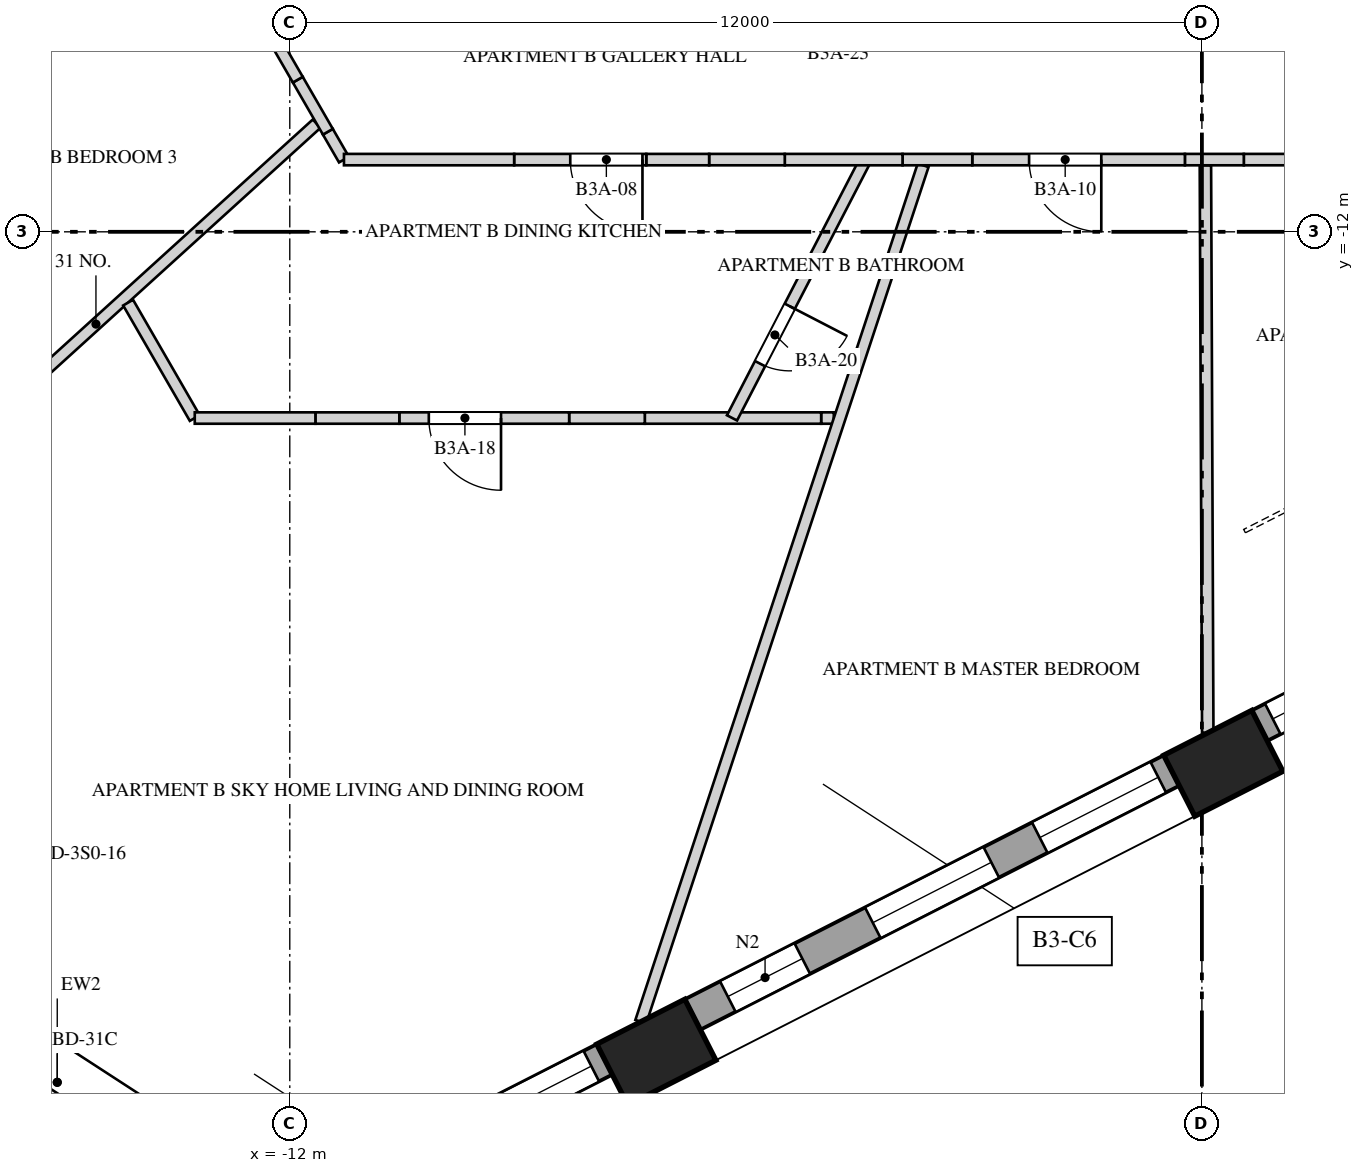
"""IFC4 building model, lengths in metres.
Left out: names, types, materials, properties, quantities, classifications, styles, units other than length and angle.
Written with IfcOpenShell. Run it as: python <this file> out.ifc"""

import sys

from ifc_helpers import new_model, si_unit, direction, frame, frame_2d, origin, origin_2d, place, context, subcontext, project, spatial, polyline, rectangle, outline, extrude, element, fill, save


model = new_model("IFC4")
c1 = context("Model", 3, precision=1e-05, world=origin(), true_north=direction((0.0, 1.0)))
c2 = subcontext(c1, "Body", "Model", "MODEL_VIEW")
j1 = project(units=[si_unit("LENGTHUNIT", "METRE"), si_unit("PLANEANGLEUNIT", "RADIAN")], contexts=[c1])
p1 = place(None, origin())
s1 = spatial("IfcSite", under=j1, at=p1, CompositionType="ELEMENT")
p2 = place(p1, origin())
s2 = spatial("IfcBuilding", under=s1, at=p2, CompositionType="ELEMENT")
p3 = place(p2, frame((0.0, 0.0, 129.6)))
s3 = spatial("IfcBuildingStorey", under=s2, at=p3, CompositionType="ELEMENT", Elevation=129.6)
for number, where, z_axis, x_axis in (
    (1, (-7.178, -22.793, 0.0), (0.0, 0.0, 1.0), (0.891, 0.454, 0.0)),
    (2, (0.281, -18.992, 0.0), (0.0, 0.0, 1.0), (0.891, 0.454, 0.0)),
):
    element("IfcColumn", number, at=place(p3, frame(where, z_axis=z_axis, x_axis=x_axis)), inside=s3, PredefinedType="COLUMN", context=c2, shape_type="SweptSolid", body=[
        extrude(rectangle(XDim=1.3, YDim=0.9, at=origin_2d()), origin(), (0.0, 0.0, 1.0), 4.0),
    ])
p4 = place(p3, frame((-13.581, -25.803, 0.0), z_axis=(0.0, 0.0, 1.0), x_axis=(0.891010191031, 0.453983303085, 0.0)))
e3 = element("IfcWall", 3, at=p4, inside=s3, PredefinedType="SOLIDWALL", context=c2, shape_type="SweptSolid", body=[
    extrude(rectangle(XDim=6.422, YDim=0.45, at=frame_2d((3.211, 0.0))), origin(), (0.0, 0.0, 1.0), 3.3),
])
p5 = place(p4, frame((0.195, 0.0, 0.5)))
e4 = element("IfcOpeningElement", 4, at=p5, cuts=e3, PredefinedType="OPENING", context=c2, shape_type="SweptSolid", body=[
    extrude(rectangle(XDim=1.1, YDim=2.0, at=frame_2d((0.55, 1.0))), frame((0.0, 0.235, 0.0), z_axis=(0.0, -1.0, 0.0), x_axis=(1.0, 0.0, 0.0)), (0.0, 0.0, 1.0), 0.47),
])
p6 = place(p4, frame((2.011, 0.0, 0.5)))
e5 = element("IfcOpeningElement", 5, at=p6, cuts=e3, PredefinedType="OPENING", context=c2, shape_type="SweptSolid", body=[
    extrude(rectangle(XDim=1.75, YDim=2.65, at=frame_2d((0.875, 1.325))), frame((0.0, 0.235, 0.0), z_axis=(0.0, -1.0, 0.0), x_axis=(1.0, 0.0, 0.0)), (0.0, 0.0, 1.0), 0.47),
])
p7 = place(p4, frame((4.476, 0.0, 0.5)))
e6 = element("IfcOpeningElement", 6, at=p7, cuts=e3, PredefinedType="OPENING", context=c2, shape_type="SweptSolid", body=[
    extrude(rectangle(XDim=1.75, YDim=2.65, at=frame_2d((0.875, 1.325))), frame((0.0, 0.235, 0.0), z_axis=(0.0, -1.0, 0.0), x_axis=(1.0, 0.0, 0.0)), (0.0, 0.0, 1.0), 0.47),
])
p8 = place(p3, frame((-6.701, -22.297, 0.0), z_axis=(0.0, 0.0, 1.0), x_axis=(0.891004189171, 0.45399508244, 0.0)))
e7 = element("IfcWall", 7, at=p8, inside=s3, PredefinedType="SOLIDWALL", context=c2, shape_type="SweptSolid", body=[
    extrude(rectangle(XDim=7.072, YDim=0.45, at=frame_2d((3.536, 0.0))), origin(), (0.0, 0.0, 1.0), 3.3),
])
p9 = place(p8, frame((0.52, 0.0, 0.5)))
e8 = element("IfcOpeningElement", 8, at=p9, cuts=e7, PredefinedType="OPENING", context=c2, shape_type="SweptSolid", body=[
    extrude(rectangle(XDim=1.1, YDim=2.65, at=frame_2d((0.55, 1.325))), frame((0.0, 0.235, 0.0), z_axis=(0.0, -1.0, 0.0), x_axis=(1.0, 0.0, 0.0)), (0.0, 0.0, 1.0), 0.47),
])
p10 = place(p8, frame((2.661, 0.0, 0.5)))
e9 = element("IfcOpeningElement", 9, at=p10, cuts=e7, PredefinedType="OPENING", context=c2, shape_type="SweptSolid", body=[
    extrude(rectangle(XDim=1.75, YDim=2.65, at=frame_2d((0.875, 1.325))), frame((0.0, 0.235, 0.0), z_axis=(0.0, -1.0, 0.0), x_axis=(1.0, 0.0, 0.0)), (0.0, 0.0, 1.0), 0.47),
])
p11 = place(p8, frame((5.126, 0.0, 0.5)))
e10 = element("IfcOpeningElement", 10, at=p11, cuts=e7, PredefinedType="OPENING", context=c2, shape_type="SweptSolid", body=[
    extrude(rectangle(XDim=1.75, YDim=2.65, at=frame_2d((0.875, 1.325))), frame((0.0, 0.235, 0.0), z_axis=(0.0, -1.0, 0.0), x_axis=(1.0, 0.0, 0.0)), (0.0, 0.0, 1.0), 0.47),
])
p12 = place(p3, frame((0.758, -18.497, 0.0), z_axis=(0.0, 0.0, 1.0), x_axis=(0.890979432498, 0.454043666254, 0.0)))
e11 = element("IfcWall", 11, at=p12, inside=s3, PredefinedType="SOLIDWALL", context=c2, shape_type="SweptSolid", body=[
    extrude(rectangle(XDim=2.141, YDim=0.45, at=frame_2d((1.07, 0.0))), origin(), (0.0, 0.0, 1.0), 3.3),
])
p13 = place(p12, frame((0.195, 0.0, 0.5)))
e12 = element("IfcOpeningElement", 12, at=p13, cuts=e11, PredefinedType="OPENING", context=c2, shape_type="SweptSolid", body=[
    extrude(rectangle(XDim=1.75, YDim=2.65, at=frame_2d((0.875, 1.325))), frame((0.0, 0.235, 0.0), z_axis=(0.0, -1.0, 0.0), x_axis=(1.0, 0.0, 0.0)), (0.0, 0.0, 1.0), 0.47),
])
p14 = place(p3, frame((-13.592, -24.142, 0.0), z_axis=(0.0, 0.0, 1.0), x_axis=(-0.838665071449, 0.544647498784, 0.0)))
e13 = element("IfcWall", 13, at=p14, inside=s3, PredefinedType="SOLIDWALL", context=c2, shape_type="SweptSolid", body=[
    extrude(rectangle(XDim=3.5, YDim=0.9, at=frame_2d((1.75, 0.0))), origin(), (0.0, 0.0, 1.0), 3.3),
])
p15 = place(p14, frame((0.75, 0.0, 0.0)))
e14 = element("IfcOpeningElement", 14, at=p15, cuts=e13, PredefinedType="OPENING", context=c2, shape_type="SweptSolid", body=[
    extrude(rectangle(XDim=2.0, YDim=2.4, at=frame_2d((1.0, 1.2))), frame((0.0, 0.46, 0.0), z_axis=(0.0, -1.0, 0.0), x_axis=(1.0, 0.0, 0.0)), (0.0, 0.0, 1.0), 0.92),
])
p16 = place(p3, frame((-17.454, -15.851, 0.0), z_axis=(0.0, 0.0, 1.0), x_axis=(0.740276567096, 0.672302464824, 0.0)))
e15 = element("IfcWall", 15, at=p16, inside=s3, PredefinedType="PARTITIONING", context=c2, shape_type="SweptSolid", body=[
    extrude(rectangle(XDim=7.844, YDim=0.15, at=frame_2d((3.922, 0.0))), origin(), (0.0, 0.0, 1.0), 2.75),
])
p17 = place(p3, frame((-13.25, -14.45, 0.0), z_axis=(0.0, 0.0, 1.0), x_axis=(-0.500047902311, 0.865997745606, 0.0)))
e16 = element("IfcWall", 16, at=p17, inside=s3, PredefinedType="PARTITIONING", context=c2, shape_type="SweptSolid", body=[
    extrude(rectangle(XDim=1.753, YDim=0.15, at=frame_2d((0.876, 0.0))), origin(), (0.0, 0.0, 1.0), 3.65),
])
p18 = place(p3, frame((-11.287, -11.05, 0.0), z_axis=(0.0, 0.0, 1.0), x_axis=(-0.499489419809, 0.866319986782, 0.0)))
e17 = element("IfcWall", 17, at=p18, inside=s3, PredefinedType="PARTITIONING", context=c2, shape_type="SweptSolid", body=[
    extrude(rectangle(XDim=0.423, YDim=0.15, at=frame_2d((0.212, 0.0))), origin(), (0.0, 0.0, 1.0), 3.65),
])
p19 = place(p3, frame((-11.499, -10.683, 0.0), z_axis=(0.0, 0.0, 1.0), x_axis=(-0.50012328804, 0.865954211699, 0.0)))
e18 = element("IfcWall", 18, at=p19, inside=s3, PredefinedType="PARTITIONING", context=c2, shape_type="SweptSolid", body=[
    extrude(rectangle(XDim=0.791, YDim=0.15, at=frame_2d((0.396, 0.0))), origin(), (0.0, 0.0, 1.0), 2.75),
])
p20 = place(p3, frame((-11.894, -9.999, 0.0), z_axis=(0.0, 0.0, 1.0), x_axis=(-0.500000251441, 0.866025258615, 0.0)))
e19 = element("IfcWall", 19, at=p20, inside=s3, PredefinedType="PARTITIONING", context=c2, shape_type="SweptSolid", body=[
    extrude(rectangle(XDim=4.209, YDim=0.15, at=frame_2d((2.105, 0.0))), origin(), (0.0, 0.0, 1.0), 3.65),
])
p21 = place(p20, frame((1.313, 0.0, 0.0)))
e20 = element("IfcOpeningElement", 20, at=p21, cuts=e19, PredefinedType="OPENING", context=c2, shape_type="SweptSolid", body=[
    extrude(rectangle(XDim=0.95, YDim=2.4, at=frame_2d((0.475, 1.2))), frame((0.0, 0.085, 0.0), z_axis=(0.0, -1.0, 0.0), x_axis=(1.0, 0.0, 0.0)), (0.0, 0.0, 1.0), 0.17),
])
p22 = place(p3, frame((-4.843, -14.45, 0.0), z_axis=(0.0, 0.0, 1.0), x_axis=(-1.0, 0.0, 0.0)))
e21 = element("IfcWall", 21, at=p22, inside=s3, PredefinedType="PARTITIONING", context=c2, shape_type="SweptSolid", body=[
    extrude(rectangle(XDim=0.166, YDim=0.15, at=frame_2d((0.083, 0.0))), origin(), (0.0, 0.0, 1.0), 2.55),
])
p23 = place(p3, frame((-5.009, -14.45, 0.0), z_axis=(0.0, 0.0, 1.0), x_axis=(-1.0, 0.0, 0.0)))
e22 = element("IfcWall", 22, at=p23, inside=s3, PredefinedType="PARTITIONING", context=c2, shape_type="SweptSolid", body=[
    extrude(rectangle(XDim=2.321, YDim=0.15, at=frame_2d((1.16, 0.0))), origin(), (0.0, 0.0, 1.0), 3.65),
])
p24 = place(p3, frame((-7.33, -14.45, 0.0), z_axis=(0.0, 0.0, 1.0), x_axis=(-1.0, 0.0, 0.0)))
e23 = element("IfcWall", 23, at=p24, inside=s3, PredefinedType="PARTITIONING", context=c2, shape_type="SweptSolid", body=[
    extrude(rectangle(XDim=0.995, YDim=0.15, at=frame_2d((0.498, 0.0))), origin(), (0.0, 0.0, 1.0), 2.55),
])
p25 = place(p3, frame((-8.325, -14.45, 0.0), z_axis=(0.0, 0.0, 1.0), x_axis=(-1.0, 0.0, 0.0)))
e24 = element("IfcWall", 24, at=p25, inside=s3, PredefinedType="PARTITIONING", context=c2, shape_type="SweptSolid", body=[
    extrude(rectangle(XDim=2.234, YDim=0.15, at=frame_2d((1.117, 0.0))), origin(), (0.0, 0.0, 1.0), 3.65),
])
p26 = place(p25, frame((0.896, 0.0, 0.0)))
e25 = element("IfcOpeningElement", 25, at=p26, cuts=e24, PredefinedType="OPENING", context=c2, shape_type="SweptSolid", body=[
    extrude(rectangle(XDim=0.95, YDim=2.4, at=frame_2d((0.475, 1.2))), frame((0.0, 0.085, 0.0), z_axis=(0.0, -1.0, 0.0), x_axis=(1.0, 0.0, 0.0)), (0.0, 0.0, 1.0), 0.17),
])
p27 = place(p3, frame((-10.559, -14.45, 0.0), z_axis=(0.0, 0.0, 1.0), x_axis=(-1.0, 0.0, 0.0)))
e26 = element("IfcWall", 26, at=p27, inside=s3, PredefinedType="PARTITIONING", context=c2, shape_type="SweptSolid", body=[
    extrude(rectangle(XDim=1.104, YDim=0.15, at=frame_2d((0.552, 0.0))), origin(), (0.0, 0.0, 1.0), 2.55),
])
p28 = place(p3, frame((-11.663, -14.45, 0.0), z_axis=(0.0, 0.0, 1.0), x_axis=(-1.0, 0.0, 0.0)))
e27 = element("IfcWall", 27, at=p28, inside=s3, PredefinedType="PARTITIONING", context=c2, shape_type="SweptSolid", body=[
    extrude(rectangle(XDim=1.587, YDim=0.15, at=frame_2d((0.794, 0.0))), origin(), (0.0, 0.0, 1.0), 3.65),
])
p29 = place(p3, frame((-4.425, -11.052, 0.0), z_axis=(0.0, 0.0, 1.0), x_axis=(-0.459481978347, -0.888187092664, 0.0)))
e28 = element("IfcWall", 28, at=p29, inside=s3, PredefinedType="PARTITIONING", context=c2, shape_type="SweptSolid", body=[
    extrude(rectangle(XDim=3.823, YDim=0.15, at=frame_2d((1.912, 0.0))), origin(), (0.0, 0.0, 1.0), 3.65),
])
p30 = place(p29, frame((2.17, 0.0, 0.0)))
e29 = element("IfcOpeningElement", 29, at=p30, cuts=e28, PredefinedType="OPENING", context=c2, shape_type="SweptSolid", body=[
    extrude(rectangle(XDim=0.85, YDim=2.4, at=frame_2d((0.425, 1.2))), frame((0.0, 0.085, 0.0), z_axis=(0.0, -1.0, 0.0), x_axis=(1.0, 0.0, 0.0)), (0.0, 0.0, 1.0), 0.17),
])
p31 = place(p3, frame((-3.668, -11.125, 0.0), z_axis=(0.0, 0.0, 1.0), x_axis=(-0.313095908813, -0.949721512805, 0.0)))
e30 = element("IfcWall", 30, at=p31, inside=s3, PredefinedType="PARTITIONING", context=c2, shape_type="SweptSolid", body=[
    extrude(rectangle(XDim=11.863, YDim=0.15, at=frame_2d((5.932, 0.0))), origin(), (0.0, 0.0, 1.0), 2.55),
])
p32 = place(p3, frame((0.046, -11.125, 0.0), z_axis=(0.0, 0.0, 1.0), x_axis=(0.004152733795, -0.999991377364, 0.0)))
e31 = element("IfcWall", 31, at=p32, inside=s3, PredefinedType="PARTITIONING", context=c2, shape_type="SweptSolid", body=[
    extrude(rectangle(XDim=7.466, YDim=0.15, at=frame_2d((3.733, 0.0))), origin(), (0.0, 0.0, 1.0), 2.75),
])
p33 = place(p3, frame((5.251, -11.05, 0.0), z_axis=(0.0, 0.0, 1.0), x_axis=(-1.0, 0.0, 0.0)))
e32 = element("IfcWall", 32, at=p33, inside=s3, PredefinedType="PARTITIONING", context=c2, shape_type="SweptSolid", body=[
    extrude(rectangle(XDim=4.7, YDim=0.15, at=frame_2d((2.35, 0.0))), origin(), (0.0, 0.0, 1.0), 3.65),
])
p34 = place(p33, frame((1.94, 0.0, 0.0)))
e33 = element("IfcOpeningElement", 33, at=p34, cuts=e32, PredefinedType="OPENING", context=c2, shape_type="SweptSolid", body=[
    extrude(rectangle(XDim=0.95, YDim=2.4, at=frame_2d((0.475, 1.2))), frame((0.0, 0.085, 0.0), z_axis=(0.0, -1.0, 0.0), x_axis=(1.0, 0.0, 0.0)), (0.0, 0.0, 1.0), 0.17),
])
p35 = place(p3, frame((0.551, -11.05, 0.0), z_axis=(0.0, 0.0, 1.0), x_axis=(-1.0, 0.0, 0.0)))
e34 = element("IfcWall", 34, at=p35, inside=s3, PredefinedType="PARTITIONING", context=c2, shape_type="SweptSolid", body=[
    extrude(rectangle(XDim=0.775, YDim=0.15, at=frame_2d((0.388, 0.0))), origin(), (0.0, 0.0, 1.0), 2.75),
])
p36 = place(p3, frame((-0.224, -11.05, 0.0), z_axis=(0.0, 0.0, 1.0), x_axis=(-1.0, 0.0, 0.0)))
e35 = element("IfcWall", 35, at=p36, inside=s3, PredefinedType="PARTITIONING", context=c2, shape_type="SweptSolid", body=[
    extrude(rectangle(XDim=2.797, YDim=0.15, at=frame_2d((1.398, 0.0))), origin(), (0.0, 0.0, 1.0), 3.65),
])
p37 = place(p36, frame((1.1, 0.0, 0.0)))
e36 = element("IfcOpeningElement", 36, at=p37, cuts=e35, PredefinedType="OPENING", context=c2, shape_type="SweptSolid", body=[
    extrude(rectangle(XDim=0.95, YDim=2.4, at=frame_2d((0.475, 1.2))), frame((0.0, 0.085, 0.0), z_axis=(0.0, -1.0, 0.0), x_axis=(1.0, 0.0, 0.0)), (0.0, 0.0, 1.0), 0.17),
])
p38 = place(p3, frame((-3.021, -11.05, 0.0), z_axis=(0.0, 0.0, 1.0), x_axis=(-1.0, 0.0, 0.0)))
e37 = element("IfcWall", 37, at=p38, inside=s3, PredefinedType="PARTITIONING", context=c2, shape_type="SweptSolid", body=[
    extrude(rectangle(XDim=0.917, YDim=0.15, at=frame_2d((0.459, 0.0))), origin(), (0.0, 0.0, 1.0), 2.55),
])
p39 = place(p3, frame((-3.938, -11.05, 0.0), z_axis=(0.0, 0.0, 1.0), x_axis=(-1.0, 0.0, 0.0)))
e38 = element("IfcWall", 38, at=p39, inside=s3, PredefinedType="PARTITIONING", context=c2, shape_type="SweptSolid", body=[
    extrude(rectangle(XDim=1.549, YDim=0.15, at=frame_2d((0.775, 0.0))), origin(), (0.0, 0.0, 1.0), 3.65),
])
p40 = place(p3, frame((-5.488, -11.05, 0.0), z_axis=(0.0, 0.0, 1.0), x_axis=(-1.0, 0.0, 0.0)))
e39 = element("IfcWall", 39, at=p40, inside=s3, PredefinedType="PARTITIONING", context=c2, shape_type="SweptSolid", body=[
    extrude(rectangle(XDim=0.995, YDim=0.15, at=frame_2d((0.498, 0.0))), origin(), (0.0, 0.0, 1.0), 2.55),
])
p41 = place(p3, frame((-6.483, -11.05, 0.0), z_axis=(0.0, 0.0, 1.0), x_axis=(-1.0, 0.0, 0.0)))
e40 = element("IfcWall", 40, at=p41, inside=s3, PredefinedType="PARTITIONING", context=c2, shape_type="SweptSolid", body=[
    extrude(rectangle(XDim=0.827, YDim=0.15, at=frame_2d((0.414, 0.0))), origin(), (0.0, 0.0, 1.0), 3.65),
])
p42 = place(p3, frame((-7.31, -11.05, 0.0), z_axis=(0.0, 0.0, 1.0), x_axis=(-1.0, 0.0, 0.0)))
e41 = element("IfcWall", 41, at=p42, inside=s3, PredefinedType="PARTITIONING", context=c2, shape_type="SweptSolid", body=[
    extrude(outline(polyline([(0.0, 0.0), (1.738, 0.0), (1.738, 2.55), (0.635, 2.55), (0.635, 3.65), (0.0, 3.65), (0.0, 0.0)])), frame((0.0, 0.075, 0.0), z_axis=(0.0, -1.0, 0.0), x_axis=(1.0, 0.0, 0.0)), (0.0, 0.0, 1.0), 0.15),
])
p43 = place(p42, frame((0.05, 0.0, 0.0)))
e42 = element("IfcOpeningElement", 42, at=p43, cuts=e41, PredefinedType="OPENING", context=c2, shape_type="SweptSolid", body=[
    extrude(rectangle(XDim=0.95, YDim=2.4, at=frame_2d((0.475, 1.2))), frame((0.0, 0.085, 0.0), z_axis=(0.0, -1.0, 0.0), x_axis=(1.0, 0.0, 0.0)), (0.0, 0.0, 1.0), 0.17),
])
p44 = place(p3, frame((-9.048, -11.05, 0.0), z_axis=(0.0, 0.0, 1.0), x_axis=(-1.0, 0.0, 0.0)))
e43 = element("IfcWall", 43, at=p44, inside=s3, PredefinedType="PARTITIONING", context=c2, shape_type="SweptSolid", body=[
    extrude(rectangle(XDim=2.239, YDim=0.15, at=frame_2d((1.119, 0.0))), origin(), (0.0, 0.0, 1.0), 3.65),
])
p45 = place(p7, origin())
e44 = element("IfcWindow", 44, at=p45, inside=s3, PartitioningType="SINGLE_PANEL", PredefinedType="WINDOW", context=c2, shape_type="SweptSolid", body=[
    extrude(rectangle(XDim=1.75, YDim=2.65, at=frame_2d((0.875, 1.325))), frame((0.0, 0.03, 0.0), z_axis=(0.0, -1.0, 0.0), x_axis=(1.0, 0.0, 0.0)), (0.0, 0.0, 1.0), 0.06),
])
fill(e6, e44)
p46 = place(p9, origin())
e45 = element("IfcWindow", 45, at=p46, inside=s3, PartitioningType="SINGLE_PANEL", PredefinedType="WINDOW", context=c2, shape_type="SweptSolid", body=[
    extrude(rectangle(XDim=1.1, YDim=2.65, at=frame_2d((0.55, 1.325))), frame((0.0, 0.03, 0.0), z_axis=(0.0, -1.0, 0.0), x_axis=(1.0, 0.0, 0.0)), (0.0, 0.0, 1.0), 0.06),
])
fill(e8, e45)
p47 = place(p10, origin())
e46 = element("IfcWindow", 46, at=p47, inside=s3, PartitioningType="SINGLE_PANEL", PredefinedType="WINDOW", context=c2, shape_type="SweptSolid", body=[
    extrude(rectangle(XDim=1.75, YDim=2.65, at=frame_2d((0.875, 1.325))), frame((0.0, 0.03, 0.0), z_axis=(0.0, -1.0, 0.0), x_axis=(1.0, 0.0, 0.0)), (0.0, 0.0, 1.0), 0.06),
])
fill(e9, e46)
p48 = place(p11, origin())
e47 = element("IfcWindow", 47, at=p48, inside=s3, PartitioningType="SINGLE_PANEL", PredefinedType="WINDOW", context=c2, shape_type="SweptSolid", body=[
    extrude(rectangle(XDim=1.75, YDim=2.65, at=frame_2d((0.875, 1.325))), frame((0.0, 0.03, 0.0), z_axis=(0.0, -1.0, 0.0), x_axis=(1.0, 0.0, 0.0)), (0.0, 0.0, 1.0), 0.06),
])
fill(e10, e47)
p49 = place(p13, origin())
e48 = element("IfcWindow", 48, at=p49, inside=s3, PartitioningType="SINGLE_PANEL", PredefinedType="WINDOW", context=c2, shape_type="SweptSolid", body=[
    extrude(rectangle(XDim=1.75, YDim=2.65, at=frame_2d((0.875, 1.325))), frame((0.0, 0.03, 0.0), z_axis=(0.0, -1.0, 0.0), x_axis=(1.0, 0.0, 0.0)), (0.0, 0.0, 1.0), 0.06),
])
fill(e12, e48)
p50 = place(p15, origin())
e49 = element("IfcDoor", 49, at=p50, inside=s3, OperationType="SLIDING_TO_LEFT", PredefinedType="DOOR", context=c2, shape_type="SweptSolid", body=[
    extrude(rectangle(XDim=2.0, YDim=2.4, at=frame_2d((1.0, 1.2))), frame((0.0, 0.025, 0.0), z_axis=(0.0, -1.0, 0.0), x_axis=(1.0, 0.0, 0.0)), (0.0, 0.0, 1.0), 0.05),
])
fill(e14, e49)
p51 = place(p43, origin())
e50 = element("IfcDoor", 50, at=p51, inside=s3, OperationType="SINGLE_SWING_RIGHT", PredefinedType="DOOR", context=c2, shape_type="SweptSolid", body=[
    extrude(rectangle(XDim=0.95, YDim=2.4, at=frame_2d((0.475, 1.2))), frame((0.0, 0.025, 0.0), z_axis=(0.0, -1.0, 0.0), x_axis=(1.0, 0.0, 0.0)), (0.0, 0.0, 1.0), 0.05),
])
fill(e42, e50)
p52 = place(p37, origin())
e51 = element("IfcDoor", 51, at=p52, inside=s3, OperationType="SINGLE_SWING_RIGHT", PredefinedType="DOOR", context=c2, shape_type="SweptSolid", body=[
    extrude(rectangle(XDim=0.95, YDim=2.4, at=frame_2d((0.475, 1.2))), frame((0.0, 0.025, 0.0), z_axis=(0.0, -1.0, 0.0), x_axis=(1.0, 0.0, 0.0)), (0.0, 0.0, 1.0), 0.05),
])
fill(e36, e51)
p53 = place(p26, origin())
e52 = element("IfcDoor", 52, at=p53, inside=s3, OperationType="SINGLE_SWING_RIGHT", PredefinedType="DOOR", context=c2, shape_type="SweptSolid", body=[
    extrude(rectangle(XDim=0.95, YDim=2.4, at=frame_2d((0.475, 1.2))), frame((0.0, 0.025, 0.0), z_axis=(0.0, -1.0, 0.0), x_axis=(1.0, 0.0, 0.0)), (0.0, 0.0, 1.0), 0.05),
])
fill(e25, e52)
p54 = place(p30, origin())
e53 = element("IfcDoor", 53, at=p54, inside=s3, OperationType="SINGLE_SWING_RIGHT", PredefinedType="DOOR", context=c2, shape_type="SweptSolid", body=[
    extrude(rectangle(XDim=0.85, YDim=2.4, at=frame_2d((0.425, 1.2))), frame((0.0, 0.025, 0.0), z_axis=(0.0, -1.0, 0.0), x_axis=(1.0, 0.0, 0.0)), (0.0, 0.0, 1.0), 0.05),
])
fill(e29, e53)
save(model, sys.argv[1])
